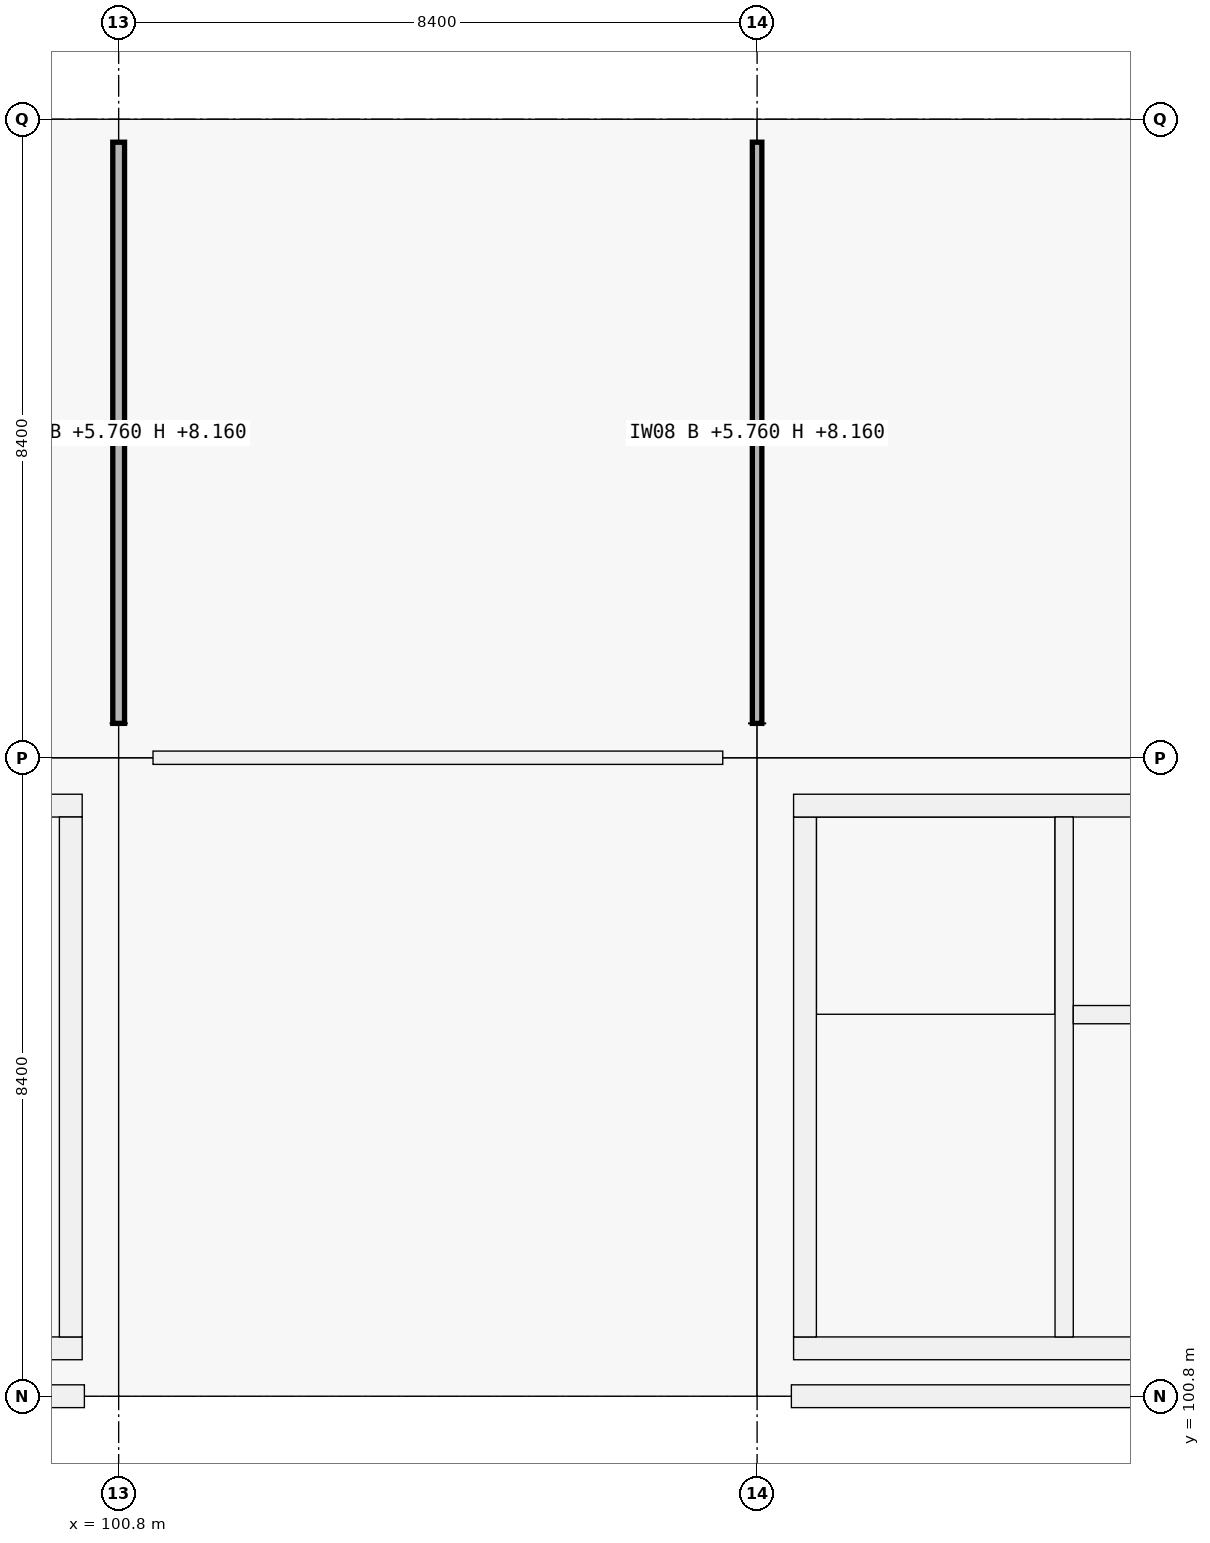
"""IFC4 building model, lengths in metres.
Left out: names, types, materials, properties, quantities, classifications, styles, units other than length and angle.
Written with IfcOpenShell. Run it as: python <this file> out.ifc"""

import sys

from ifc_helpers import new_model, si_unit, direction, frame, frame_2d, origin, origin_2d, place, context, subcontext, project, spatial, rectangle, extrude, element, fill, save


model = new_model("IFC4")
c1 = context("Model", 3, precision=1e-05, world=origin(), true_north=direction((0.0, 1.0)))
c2 = subcontext(c1, "Body", "Model", "MODEL_VIEW")
j1 = project(units=[si_unit("LENGTHUNIT", "METRE"), si_unit("PLANEANGLEUNIT", "RADIAN")], contexts=[c1])
p1 = place(None, origin())
s1 = spatial("IfcSite", under=j1, at=p1, CompositionType="ELEMENT")
p2 = place(p1, origin())
s2 = spatial("IfcBuilding", under=s1, at=p2, CompositionType="ELEMENT")
p3 = place(p2, frame((0.0, 0.0, 5.76)))
s3 = spatial("IfcBuildingStorey", under=s2, at=p3, CompositionType="ELEMENT", Elevation=5.76)
for number, where, z_axis, x_axis in (
    (1, (100.8, 100.8, 0.0), (0.0, 0.0, 1.0), (1.0, 0.0, 0.0)),
    (2, (100.8, 109.2, 0.0), (0.0, 0.0, 1.0), (1.0, 0.0, 0.0)),
):
    element("IfcColumn", number, at=place(p3, frame(where, z_axis=z_axis, x_axis=x_axis)), inside=s3, PredefinedType="COLUMN", context=c2, shape_type="SweptSolid", body=[
        extrude(rectangle(XDim=0.9, YDim=0.9, at=origin_2d()), origin(), (0.0, 0.0, 1.0), 4.5),
    ])
p4 = place(p3, frame((100.8, 117.6, 0.0), z_axis=(0.0, 0.0, 1.0), x_axis=(1.0, 0.0, 0.0)))
e3 = element("IfcColumn", 3, at=p4, inside=s3, PredefinedType="COLUMN", context=c2, shape_type="SweptSolid", body=[
    extrude(rectangle(XDim=0.9, YDim=0.6, at=origin_2d()), origin(), (0.0, 0.0, 1.0), 4.5),
])
for number, where, z_axis, x_axis in (
    (4, (109.2, 100.8, 0.0), (0.0, 0.0, 1.0), (1.0, 0.0, 0.0)),
    (5, (109.2, 109.2, 0.0), (0.0, 0.0, 1.0), (1.0, 0.0, 0.0)),
):
    element("IfcColumn", number, at=place(p3, frame(where, z_axis=z_axis, x_axis=x_axis)), inside=s3, PredefinedType="COLUMN", context=c2, shape_type="SweptSolid", body=[
        extrude(rectangle(XDim=0.9, YDim=0.9, at=origin_2d()), origin(), (0.0, 0.0, 1.0), 4.5),
    ])
p5 = place(p3, frame((109.2, 117.6, 0.0), z_axis=(0.0, 0.0, 1.0), x_axis=(1.0, 0.0, 0.0)))
e6 = element("IfcColumn", 6, at=p5, inside=s3, PredefinedType="COLUMN", context=c2, shape_type="SweptSolid", body=[
    extrude(rectangle(XDim=0.9, YDim=0.6, at=origin_2d()), origin(), (0.0, 0.0, 1.0), 4.5),
])
for number, where, z_axis, x_axis in (
    (7, (100.349, 100.8, 0.0), (0.0, 0.0, 1.0), (-1.0, 0.0, 0.0)),
    (8, (117.149, 100.8, 0.0), (0.0, 0.0, 1.0), (-1.0, 0.0, 0.0)),
):
    element("IfcWall", number, at=place(p3, frame(where, z_axis=z_axis, x_axis=x_axis)), inside=s3, PredefinedType="SOLIDWALL", context=c2, shape_type="SweptSolid", body=[
        extrude(rectangle(XDim=7.498, YDim=0.3, at=frame_2d((3.749, 0.0))), origin(), (0.0, 0.0, 1.0), 3.4),
    ])
p6 = place(p3, frame((117.12, 101.43, 0.0), z_axis=(0.0, 0.0, 1.0), x_axis=(-1.0, 0.0, 0.0)))
e9 = element("IfcWall", 9, at=p6, inside=s3, PredefinedType="SHEAR", context=c2, shape_type="SweptSolid", body=[
    extrude(rectangle(XDim=7.44, YDim=0.3, at=frame_2d((3.72, 0.0))), origin(), (0.0, 0.0, 1.0), 4.5),
])
p7 = place(p3, frame((109.83, 101.58, 0.0), z_axis=(0.0, 0.0, 1.0), x_axis=(0.0, 1.0, 0.0)))
e10 = element("IfcWall", 10, at=p7, inside=s3, PredefinedType="SHEAR", context=c2, shape_type="SweptSolid", body=[
    extrude(rectangle(XDim=6.84, YDim=0.3, at=frame_2d((3.42, 0.0))), origin(), (0.0, 0.0, 1.0), 4.5),
])
p8 = place(p3, frame((109.68, 108.57, 0.0), z_axis=(0.0, 0.0, 1.0), x_axis=(1.0, 0.0, 0.0)))
e11 = element("IfcWall", 11, at=p8, inside=s3, PredefinedType="SHEAR", context=c2, shape_type="SweptSolid", body=[
    extrude(rectangle(XDim=7.44, YDim=0.3, at=frame_2d((3.72, 0.0))), origin(), (0.0, 0.0, 1.0), 4.5),
])
p9 = place(p3, frame((113.24, 101.58, 0.0), z_axis=(0.0, 0.0, 1.0), x_axis=(0.0, 1.0, 0.0)))
e12 = element("IfcWall", 12, at=p9, inside=s3, PredefinedType="SHEAR", context=c2, shape_type="SweptSolid", body=[
    extrude(rectangle(XDim=6.84, YDim=0.24, at=frame_2d((3.42, 0.0))), origin(), (0.0, 0.0, 1.0), 4.5),
])
p10 = place(p9, frame((0.12, 0.0, 0.0)))
e13 = element("IfcOpeningElement", 13, at=p10, cuts=e12, PredefinedType="OPENING", context=c2, shape_type="SweptSolid", body=[
    extrude(rectangle(XDim=1.0, YDim=2.15, at=frame_2d((0.5, 1.075))), frame((0.0, 0.12, 0.0), z_axis=(0.0, -1.0, 0.0), x_axis=(1.0, 0.0, 0.0)), (0.0, 0.0, 1.0), 0.24),
])
p11 = place(p3, frame((113.36, 105.82, 0.0), z_axis=(0.0, 0.0, 1.0), x_axis=(1.0, 0.0, 0.0)))
e14 = element("IfcWall", 14, at=p11, inside=s3, PredefinedType="SHEAR", context=c2, shape_type="SweptSolid", body=[
    extrude(rectangle(XDim=3.46, YDim=0.24, at=frame_2d((1.73, 0.0))), origin(), (0.0, 0.0, 1.0), 4.5),
])
p12 = place(p11, frame((1.13, 0.0, 0.0)))
e15 = element("IfcOpeningElement", 15, at=p12, cuts=e14, PredefinedType="OPENING", context=c2, shape_type="SweptSolid", body=[
    extrude(rectangle(XDim=1.2, YDim=2.2, at=frame_2d((0.6, 1.1))), frame((0.0, 0.12, 0.0), z_axis=(0.0, -1.0, 0.0), x_axis=(1.0, 0.0, 0.0)), (0.0, 0.0, 1.0), 0.24),
])
for number, where, z_axis, x_axis in (
    (16, (100.32, 101.43, 0.0), (0.0, 0.0, 1.0), (-1.0, 0.0, 0.0)),
    (17, (92.88, 108.57, 0.0), (0.0, 0.0, 1.0), (1.0, 0.0, 0.0)),
):
    element("IfcWall", number, at=place(p3, frame(where, z_axis=z_axis, x_axis=x_axis)), inside=s3, PredefinedType="SHEAR", context=c2, shape_type="SweptSolid", body=[
        extrude(rectangle(XDim=7.44, YDim=0.3, at=frame_2d((3.72, 0.0))), origin(), (0.0, 0.0, 1.0), 4.5),
    ])
p13 = place(p3, frame((100.17, 108.42, 0.0), z_axis=(0.0, 0.0, 1.0), x_axis=(0.0, -1.0, 0.0)))
e18 = element("IfcWall", 18, at=p13, inside=s3, PredefinedType="SHEAR", context=c2, shape_type="SweptSolid", body=[
    extrude(rectangle(XDim=6.84, YDim=0.3, at=frame_2d((3.42, 0.0))), origin(), (0.0, 0.0, 1.0), 4.5),
])
p14 = place(p13, frame((3.97, 0.0, 0.0)))
e19 = element("IfcOpeningElement", 19, at=p14, cuts=e18, PredefinedType="OPENING", context=c2, shape_type="SweptSolid", body=[
    extrude(rectangle(XDim=1.5, YDim=2.15, at=frame_2d((0.75, 1.075))), frame((0.0, 0.15, 0.0), z_axis=(0.0, -1.0, 0.0), x_axis=(1.0, 0.0, 0.0)), (0.0, 0.0, 1.0), 0.3),
])
p15 = place(p3, frame((101.252, 109.2, 0.0), z_axis=(0.0, 0.0, 1.0), x_axis=(1.0, 0.0, 0.0)))
e20 = element("IfcWall", 20, at=p15, inside=s3, PredefinedType="PARTITIONING", context=c2, shape_type="SweptSolid", body=[
    extrude(rectangle(XDim=7.496, YDim=0.175, at=frame_2d((3.748, 0.0))), origin(), (0.0, 0.0, 1.0), 2.4),
])
p16 = place(p15, frame((3.238, 0.0, 0.0)))
e21 = element("IfcOpeningElement", 21, at=p16, cuts=e20, PredefinedType="OPENING", context=c2, shape_type="SweptSolid", body=[
    extrude(rectangle(XDim=1.02, YDim=2.2, at=frame_2d((0.51, 1.1))), frame((0.0, 0.087, 0.0), z_axis=(0.0, -1.0, 0.0), x_axis=(1.0, 0.0, 0.0)), (0.0, 0.0, 1.0), 0.175),
])
p17 = place(p3, frame((100.8, 109.652, 0.0), z_axis=(0.0, 0.0, 1.0), x_axis=(0.0, 1.0, 0.0)))
e22 = element("IfcWall", 22, at=p17, inside=s3, PredefinedType="PARTITIONING", context=c2, shape_type="SweptSolid", body=[
    extrude(rectangle(XDim=7.646, YDim=0.155, at=frame_2d((3.823, 0.0))), origin(), (0.0, 0.0, 1.0), 2.4),
])
p18 = place(p17, frame((3.343, 0.0, 0.0)))
e23 = element("IfcOpeningElement", 23, at=p18, cuts=e22, PredefinedType="OPENING", context=c2, shape_type="SweptSolid", body=[
    extrude(rectangle(XDim=0.96, YDim=2.18, at=frame_2d((0.48, 1.09))), frame((0.0, 0.078, 0.0), z_axis=(0.0, -1.0, 0.0), x_axis=(1.0, 0.0, 0.0)), (0.0, 0.0, 1.0), 0.155),
])
p19 = place(p3, frame((109.2, 109.652, 0.0), z_axis=(0.0, 0.0, 1.0), x_axis=(0.0, 1.0, 0.0)))
e24 = element("IfcWall", 24, at=p19, inside=s3, PredefinedType="PARTITIONING", context=c2, shape_type="SweptSolid", body=[
    extrude(rectangle(XDim=7.646, YDim=0.125, at=frame_2d((3.823, 0.0))), origin(), (0.0, 0.0, 1.0), 2.4),
])
p20 = place(p19, frame((3.298, 0.0, 0.0)))
e25 = element("IfcOpeningElement", 25, at=p20, cuts=e24, PredefinedType="OPENING", context=c2, shape_type="SweptSolid", body=[
    extrude(rectangle(XDim=1.05, YDim=2.12, at=frame_2d((0.525, 1.06))), frame((0.0, 0.062, 0.0), z_axis=(0.0, -1.0, 0.0), x_axis=(1.0, 0.0, 0.0)), (0.0, 0.0, 1.0), 0.125),
])
p21 = place(p10, origin())
e26 = element("IfcDoor", 26, at=p21, inside=s3, OperationType="SINGLE_SWING_LEFT", PredefinedType="DOOR", context=c2, shape_type="SweptSolid", body=[
    extrude(rectangle(XDim=1.0, YDim=2.15, at=frame_2d((0.5, 1.075))), frame((0.0, 0.025, 0.0), z_axis=(0.0, -1.0, 0.0), x_axis=(1.0, 0.0, 0.0)), (0.0, 0.0, 1.0), 0.05),
])
fill(e13, e26)
p22 = place(p14, origin())
e27 = element("IfcDoor", 27, at=p22, inside=s3, OperationType="DOUBLE_DOOR_SINGLE_SWING", PredefinedType="DOOR", context=c2, shape_type="SweptSolid", body=[
    extrude(rectangle(XDim=1.5, YDim=2.15, at=frame_2d((0.75, 1.075))), frame((0.0, 0.025, 0.0), z_axis=(0.0, -1.0, 0.0), x_axis=(1.0, 0.0, 0.0)), (0.0, 0.0, 1.0), 0.05),
])
fill(e19, e27)
p23 = place(p16, origin())
e28 = element("IfcDoor", 28, at=p23, inside=s3, OperationType="SINGLE_SWING_LEFT", PredefinedType="DOOR", context=c2, shape_type="SweptSolid", body=[
    extrude(rectangle(XDim=1.02, YDim=2.2, at=frame_2d((0.51, 1.1))), frame((0.0, 0.025, 0.0), z_axis=(0.0, -1.0, 0.0), x_axis=(1.0, 0.0, 0.0)), (0.0, 0.0, 1.0), 0.05),
])
fill(e21, e28)
p24 = place(p20, origin())
e29 = element("IfcDoor", 29, at=p24, inside=s3, OperationType="SINGLE_SWING_RIGHT", PredefinedType="DOOR", context=c2, shape_type="SweptSolid", body=[
    extrude(rectangle(XDim=1.05, YDim=2.12, at=frame_2d((0.525, 1.06))), frame((0.0, 0.025, 0.0), z_axis=(0.0, -1.0, 0.0), x_axis=(1.0, 0.0, 0.0)), (0.0, 0.0, 1.0), 0.05),
])
fill(e25, e29)
p25 = place(p18, origin())
e30 = element("IfcDoor", 30, at=p25, inside=s3, OperationType="SINGLE_SWING_RIGHT", PredefinedType="DOOR", context=c2, shape_type="SweptSolid", body=[
    extrude(rectangle(XDim=0.96, YDim=2.18, at=frame_2d((0.48, 1.09))), frame((0.0, 0.025, 0.0), z_axis=(0.0, -1.0, 0.0), x_axis=(1.0, 0.0, 0.0)), (0.0, 0.0, 1.0), 0.05),
])
fill(e23, e30)
save(model, sys.argv[1])
